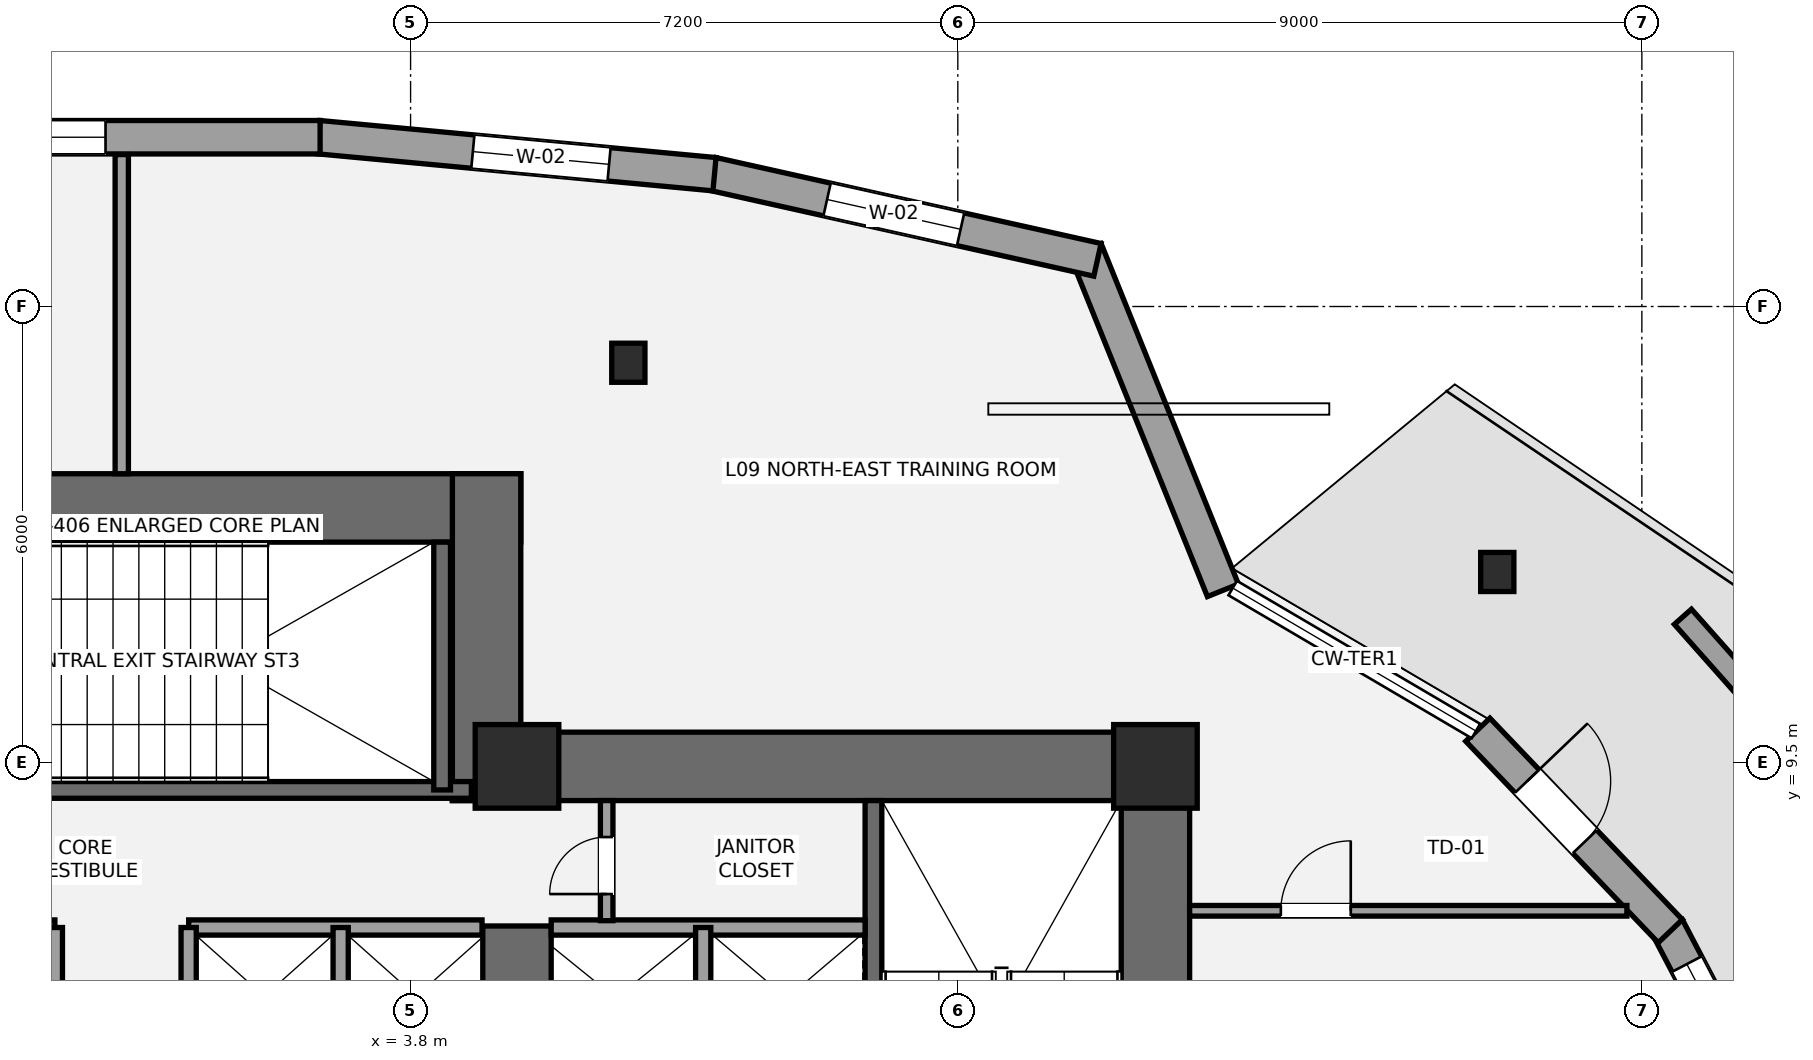
"""IFC4 building model, lengths in metres.
Left out: names, types, materials, properties, quantities, classifications, styles, units other than length and angle.
Written with IfcOpenShell. Run it as: python <this file> out.ifc"""

import sys

from ifc_helpers import new_model, si_unit, direction, frame, frame_2d, origin, origin_2d, place, context, subcontext, project, spatial, rectangle, i_section, extrude, element, fill, save


model = new_model("IFC4")
c1 = context("Model", 3, precision=1e-05, world=origin(), true_north=direction((0.0, 1.0)))
c2 = subcontext(c1, "Body", "Model", "MODEL_VIEW")
j1 = project(units=[si_unit("LENGTHUNIT", "METRE"), si_unit("PLANEANGLEUNIT", "RADIAN")], contexts=[c1])
p1 = place(None, origin())
s1 = spatial("IfcSite", under=j1, at=p1, CompositionType="ELEMENT")
p2 = place(p1, origin())
s2 = spatial("IfcBuilding", under=s1, at=p2, CompositionType="ELEMENT")
p3 = place(p2, frame((0.0, 0.0, 37.8)))
s3 = spatial("IfcBuildingStorey", under=s2, at=p3, CompositionType="ELEMENT", Elevation=37.8)
p4 = place(p3, frame((13.6, 0.95, 0.0), z_axis=(0.0, 0.0, 1.0), x_axis=(0.0, 1.0, 0.0)))
e1 = element("IfcWall", 1, at=p4, inside=s3, PredefinedType="SHEAR", context=c2, shape_type="SweptSolid", body=[
    extrude(rectangle(XDim=8.95, YDim=0.9, at=frame_2d((4.475, 0.0))), origin(), (0.0, 0.0, 1.0), 3.6),
])
p5 = place(p3, frame((4.35, 9.45, 0.0), z_axis=(0.0, 0.0, 1.0), x_axis=(1.0, 0.0, 0.0)))
e2 = element("IfcWall", 2, at=p5, inside=s3, PredefinedType="SHEAR", context=c2, shape_type="SweptSolid", body=[
    extrude(rectangle(XDim=9.7, YDim=0.9, at=frame_2d((4.85, 0.0))), origin(), (0.0, 0.0, 1.0), 3.6),
])
p6 = place(p3, frame((5.2, 5.35, 0.0), z_axis=(0.0, 0.0, 1.0), x_axis=(0.0, 1.0, 0.0)))
e3 = element("IfcWall", 3, at=p6, inside=s3, PredefinedType="SHEAR", context=c2, shape_type="SweptSolid", body=[
    extrude(rectangle(XDim=2.0, YDim=0.9, at=frame_2d((1.0, 0.0))), origin(), (0.0, 0.0, 1.0), 3.6),
])
p7 = place(p3, frame((9.89, 1.85, 0.0), z_axis=(0.0, 0.0, 1.0), x_axis=(0.0, 1.0, 0.0)))
e4 = element("IfcWall", 4, at=p7, inside=s3, PredefinedType="SHEAR", context=c2, shape_type="SweptSolid", body=[
    extrude(rectangle(XDim=7.15, YDim=0.22, at=frame_2d((3.575, 0.0))), origin(), (0.0, 0.0, 1.0), 3.6),
])
p8 = place(p3, frame((-5.25, 12.85, 0.0), z_axis=(0.0, 0.0, 1.0), x_axis=(1.0, 0.0, 0.0)))
e5 = element("IfcWall", 5, at=p8, inside=s3, PredefinedType="SHEAR", context=c2, shape_type="SweptSolid", body=[
    extrude(rectangle(XDim=10.5, YDim=0.9, at=frame_2d((5.25, 0.0))), origin(), (0.0, 0.0, 1.0), 3.6),
])
p9 = place(p3, frame((4.8, 9.0, 0.0), z_axis=(0.0, 0.0, 1.0), x_axis=(0.0, 1.0, 0.0)))
e6 = element("IfcWall", 6, at=p9, inside=s3, PredefinedType="SHEAR", context=c2, shape_type="SweptSolid", body=[
    extrude(rectangle(XDim=4.3, YDim=0.9, at=frame_2d((2.15, 0.0))), origin(), (0.0, 0.0, 1.0), 3.6),
])
p10 = place(p3, frame((-4.7, 9.14, 0.0), z_axis=(0.0, 0.0, 1.0), x_axis=(1.0, 0.0, 0.0)))
e7 = element("IfcWall", 7, at=p10, inside=s3, PredefinedType="SHEAR", context=c2, shape_type="SweptSolid", body=[
    extrude(rectangle(XDim=9.3, YDim=0.22, at=frame_2d((4.65, 0.0))), origin(), (0.0, 0.0, 1.0), 3.6),
])
p11 = place(p10, frame((1.15, 0.0, 0.0)))
e8 = element("IfcOpeningElement", 8, at=p11, cuts=e7, PredefinedType="OPENING", context=c2, shape_type="SweptSolid", body=[
    extrude(rectangle(XDim=1.05, YDim=2.15, at=frame_2d((0.525, 1.075))), frame((0.0, 0.12, 0.0), z_axis=(0.0, -1.0, 0.0), x_axis=(1.0, 0.0, 0.0)), (0.0, 0.0, 1.0), 0.24),
])
p12 = place(p3, frame((4.215, 9.14, 0.0), z_axis=(0.0, 0.0, 1.0), x_axis=(0.0, 1.0, 0.0)))
e9 = element("IfcWall", 9, at=p12, inside=s3, PredefinedType="SHEAR", context=c2, shape_type="SweptSolid", body=[
    extrude(rectangle(XDim=3.26, YDim=0.22, at=frame_2d((1.63, 0.0))), origin(), (0.0, 0.0, 1.0), 3.6),
])
for number, where, z_axis, x_axis in (
    (10, (5.2, 9.45, 0.0), (0.0, 0.0, 1.0), (1.0, 0.0, 0.0)),
    (11, (13.6, 9.45, 0.0), (0.0, 0.0, 1.0), (1.0, 0.0, 0.0)),
):
    element("IfcColumn", number, at=place(p3, frame(where, z_axis=z_axis, x_axis=x_axis)), inside=s3, PredefinedType="COLUMN", context=c2, shape_type="SweptSolid", body=[
        extrude(rectangle(XDim=1.1, YDim=1.1, at=origin_2d()), origin(), (0.0, 0.0, 1.0), 3.6),
    ])
for number, where, z_axis, x_axis in (
    (12, (18.098, 12.007, 0.0), (0.0, 0.0, 1.0), (1.0, 0.0, 0.0)),
    (13, (6.665, 14.76, 0.0), (0.0, 0.0, 1.0), (1.0, 0.0, 0.0)),
):
    element("IfcColumn", number, at=place(p3, frame(where, z_axis=z_axis, x_axis=x_axis)), inside=s3, PredefinedType="COLUMN", context=c2, shape_type="SweptSolid", body=[
        extrude(i_section(OverallWidth=0.437, OverallDepth=0.514, WebThickness=0.061, FlangeThickness=0.097, at=origin_2d()), origin(), (0.0, 0.0, 1.0), 3.6),
    ])
p13 = place(p3, frame((20.338, 7.332, 0.0), z_axis=(0.0, 0.0, 1.0), x_axis=(0.463942961536, -0.885865073497, 0.0)))
e14 = element("IfcWall", 14, at=p13, inside=s3, PredefinedType="STANDARD", context=c2, shape_type="SweptSolid", body=[
    extrude(rectangle(XDim=3.277, YDim=0.44, at=frame_2d((1.638, 0.0))), origin(), (0.0, 0.0, 1.0), 2.533),
])
p14 = place(p13, frame((0.546, 0.0, 0.58)))
e15 = element("IfcOpeningElement", 15, at=p14, cuts=e14, PredefinedType="OPENING", context=c2, shape_type="SweptSolid", body=[
    extrude(rectangle(XDim=0.9, YDim=1.35, at=frame_2d((0.45, 0.675))), frame((0.0, 0.23, 0.0), z_axis=(0.0, -1.0, 0.0), x_axis=(1.0, 0.0, 0.0)), (0.0, 0.0, 1.0), 0.46),
])
p15 = place(p3, frame((17.842, 9.932, 0.0), z_axis=(0.0, 0.0, 1.0), x_axis=(0.690906512539, -0.722944113284, 0.0)))
e16 = element("IfcWall", 16, at=p15, inside=s3, PredefinedType="STANDARD", context=c2, shape_type="SweptSolid", body=[
    extrude(rectangle(XDim=3.666, YDim=0.44, at=frame_2d((1.833, 0.0))), origin(), (0.0, 0.0, 1.0), 2.533),
])
p16 = place(p15, frame((0.938, 0.0, 0.0)))
e17 = element("IfcOpeningElement", 17, at=p16, cuts=e16, PredefinedType="OPENING", context=c2, shape_type="SweptSolid", body=[
    extrude(rectangle(XDim=1.1, YDim=2.15, at=frame_2d((0.55, 1.075))), frame((0.0, 0.23, 0.0), z_axis=(0.0, -1.0, 0.0), x_axis=(1.0, 0.0, 0.0)), (0.0, 0.0, 1.0), 0.46),
])
p17 = place(p3, frame((12.681, 16.247, 0.0), z_axis=(0.0, 0.0, 1.0), x_axis=(0.373950808571, -0.927448539149, 0.0)))
e18 = element("IfcWall", 18, at=p17, inside=s3, PredefinedType="STANDARD", context=c2, shape_type="SweptSolid", body=[
    extrude(rectangle(XDim=4.831, YDim=0.44, at=frame_2d((2.416, 0.0))), origin(), (0.0, 0.0, 1.0), 2.533),
])
p18 = place(p3, frame((7.771, 17.245, 0.0), z_axis=(0.0, 0.0, 1.0), x_axis=(0.975980782399, -0.217856632648, 0.0)))
e19 = element("IfcWall", 19, at=p18, inside=s3, PredefinedType="STANDARD", context=c2, shape_type="SweptSolid", body=[
    extrude(rectangle(XDim=5.191, YDim=0.44, at=frame_2d((2.595, 0.0))), origin(), (0.0, 0.0, 1.0), 2.533),
])
p19 = place(p18, frame((1.546, 0.0, 0.65)))
e20 = element("IfcOpeningElement", 20, at=p19, cuts=e19, PredefinedType="OPENING", context=c2, shape_type="SweptSolid", body=[
    extrude(rectangle(XDim=1.8, YDim=1.7, at=frame_2d((0.9, 0.85))), frame((0.0, 0.23, 0.0), z_axis=(0.0, -1.0, 0.0), x_axis=(1.0, 0.0, 0.0)), (0.0, 0.0, 1.0), 0.46),
])
p20 = place(p3, frame((2.589, 17.728, 0.0), z_axis=(0.0, 0.0, 1.0), x_axis=(0.995649119539, -0.093181708301, 0.0)))
e21 = element("IfcWall", 21, at=p20, inside=s3, PredefinedType="STANDARD", context=c2, shape_type="SweptSolid", body=[
    extrude(rectangle(XDim=5.232, YDim=0.44, at=frame_2d((2.616, 0.0))), origin(), (0.0, 0.0, 1.0), 2.533),
])
p21 = place(p20, frame((2.039, 0.0, 0.65)))
e22 = element("IfcOpeningElement", 22, at=p21, cuts=e21, PredefinedType="OPENING", context=c2, shape_type="SweptSolid", body=[
    extrude(rectangle(XDim=1.8, YDim=1.7, at=frame_2d((0.9, 0.85))), frame((0.0, 0.23, 0.0), z_axis=(0.0, -1.0, 0.0), x_axis=(1.0, 0.0, 0.0)), (0.0, 0.0, 1.0), 0.46),
])
p22 = place(p3, frame((-2.61, 17.727, 0.0), z_axis=(0.0, 0.0, 1.0), x_axis=(1.0, 0.0, 0.0)))
e23 = element("IfcWall", 23, at=p22, inside=s3, PredefinedType="STANDARD", context=c2, shape_type="SweptSolid", body=[
    extrude(rectangle(XDim=5.219, YDim=0.44, at=frame_2d((2.61, 0.0))), origin(), (0.0, 0.0, 1.0), 2.533),
])
p23 = place(p22, frame((0.596, 0.0, 0.65)))
e24 = element("IfcOpeningElement", 24, at=p23, cuts=e23, PredefinedType="OPENING", context=c2, shape_type="SweptSolid", body=[
    extrude(rectangle(XDim=1.8, YDim=1.7, at=frame_2d((0.9, 0.85))), frame((0.0, 0.23, 0.0), z_axis=(0.0, -1.0, 0.0), x_axis=(1.0, 0.0, 0.0)), (0.0, 0.0, 1.0), 0.46),
])
p24 = place(p3, frame((23.213, 8.405, 0.0), z_axis=(0.0, 0.0, 1.0), x_axis=(-0.663501894005, 0.748174603051, 0.0)))
e25 = element("IfcWall", 25, at=p24, inside=s3, PredefinedType="PARAPET", context=c2, shape_type="SweptSolid", body=[
    extrude(rectangle(XDim=4.028, YDim=0.3, at=frame_2d((2.014, 0.0))), origin(), (0.0, 0.0, 1.0), 0.45),
])
p25 = place(p3, frame((5.65, 7.33, 0.0), z_axis=(0.0, 0.0, 1.0), x_axis=(1.0, 0.0, 0.0)))
e26 = element("IfcWall", 26, at=p25, inside=s3, PredefinedType="SOLIDWALL", context=c2, shape_type="SweptSolid", body=[
    extrude(rectangle(XDim=4.13, YDim=0.2, at=frame_2d((2.065, 0.0))), origin(), (0.0, 0.0, 1.0), 3.4),
])
p26 = place(p3, frame((7.65, 5.47, 0.0), z_axis=(0.0, 0.0, 1.0), x_axis=(0.0, 1.0, 0.0)))
e27 = element("IfcWall", 27, at=p26, inside=s3, PredefinedType="SOLIDWALL", context=c2, shape_type="SweptSolid", body=[
    extrude(rectangle(XDim=1.86, YDim=0.2, at=frame_2d((0.93, 0.0))), origin(), (0.0, 0.0, 1.0), 3.4),
])
for number, where, z_axis, x_axis in (
    (28, (-4.74, 7.33, 0.0), (0.0, 0.0, 1.0), (1.0, 0.0, 0.0)),
    (29, (0.88, 7.33, 0.0), (0.0, 0.0, 1.0), (1.0, 0.0, 0.0)),
):
    element("IfcWall", number, at=place(p3, frame(where, z_axis=z_axis, x_axis=x_axis)), inside=s3, PredefinedType="SOLIDWALL", context=c2, shape_type="SweptSolid", body=[
        extrude(rectangle(XDim=3.86, YDim=0.2, at=frame_2d((1.93, 0.0))), origin(), (0.0, 0.0, 1.0), 3.4),
    ])
for number, where, z_axis, x_axis in (
    (30, (2.88, 5.52, 0.0), (0.0, 0.0, 1.0), (0.0, 1.0, 0.0)),
    (31, (-0.88, 5.52, 0.0), (0.0, 0.0, 1.0), (0.0, 1.0, 0.0)),
    (32, (0.88, 5.52, 0.0), (0.0, 0.0, 1.0), (0.0, 1.0, 0.0)),
):
    element("IfcWall", number, at=place(p3, frame(where, z_axis=z_axis, x_axis=x_axis)), inside=s3, PredefinedType="SOLIDWALL", context=c2, shape_type="SweptSolid", body=[
        extrude(rectangle(XDim=1.81, YDim=0.2, at=frame_2d((0.905, 0.0))), origin(), (0.0, 0.0, 1.0), 3.4),
    ])
p27 = place(p3, frame((6.38, 7.42, 0.0), z_axis=(0.0, 0.0, 1.0), x_axis=(0.0, 1.0, 0.0)))
e33 = element("IfcWall", 33, at=p27, inside=s3, PredefinedType="PARTITIONING", context=c2, shape_type="SweptSolid", body=[
    extrude(rectangle(XDim=1.58, YDim=0.165, at=frame_2d((0.79, 0.0))), origin(), (0.0, 0.0, 1.0), 3.4),
])
p28 = place(p27, frame((0.35, 0.0, 0.0)))
e34 = element("IfcOpeningElement", 34, at=p28, cuts=e33, PredefinedType="OPENING", context=c2, shape_type="SweptSolid", body=[
    extrude(rectangle(XDim=0.75, YDim=2.1, at=frame_2d((0.375, 1.05))), frame((0.0, 0.093, 0.0), z_axis=(0.0, -1.0, 0.0), x_axis=(1.0, 0.0, 0.0)), (0.0, 0.0, 1.0), 0.185),
])
p29 = place(p3, frame((14.05, 7.55, 0.0), z_axis=(0.0, 0.0, 1.0), x_axis=(1.0, 0.0, 0.0)))
e35 = element("IfcWall", 35, at=p29, inside=s3, PredefinedType="PARTITIONING", context=c2, shape_type="SweptSolid", body=[
    extrude(rectangle(XDim=5.753, YDim=0.14, at=frame_2d((2.876, 0.0))), origin(), (0.0, 0.0, 1.0), 2.853),
])
p30 = place(p29, frame((1.2, 0.0, 0.0)))
e36 = element("IfcOpeningElement", 36, at=p30, cuts=e35, PredefinedType="OPENING", context=c2, shape_type="SweptSolid", body=[
    extrude(rectangle(XDim=0.92, YDim=2.15, at=frame_2d((0.46, 1.075))), frame((0.0, 0.08, 0.0), z_axis=(0.0, -1.0, 0.0), x_axis=(1.0, 0.0, 0.0)), (0.0, 0.0, 1.0), 0.16),
])
p31 = place(p3, frame((0.0, 13.3, 0.0), z_axis=(0.0, 0.0, 1.0), x_axis=(0.0, 1.0, 0.0)))
e37 = element("IfcWall", 37, at=p31, inside=s3, PredefinedType="PARTITIONING", context=c2, shape_type="SweptSolid", body=[
    extrude(rectangle(XDim=4.199, YDim=0.175, at=frame_2d((2.1, 0.0))), origin(), (0.0, 0.0, 1.0), 3.4),
])
p32 = place(p14, origin())
e38 = element("IfcWindow", 38, at=p32, inside=s3, PartitioningType="SINGLE_PANEL", PredefinedType="WINDOW", context=c2, shape_type="SweptSolid", body=[
    extrude(rectangle(XDim=0.9, YDim=1.35, at=frame_2d((0.45, 0.675))), frame((0.0, -0.01, 0.0), z_axis=(0.0, -1.0, 0.0), x_axis=(1.0, 0.0, 0.0)), (0.0, 0.0, 1.0), 0.06),
])
fill(e15, e38)
p33 = place(p16, origin())
e39 = element("IfcDoor", 39, at=p33, inside=s3, OperationType="SINGLE_SWING_LEFT", PredefinedType="DOOR", context=c2, shape_type="SweptSolid", body=[
    extrude(rectangle(XDim=1.1, YDim=2.15, at=frame_2d((0.55, 1.075))), frame((0.0, 0.025, 0.0), z_axis=(0.0, -1.0, 0.0), x_axis=(1.0, 0.0, 0.0)), (0.0, 0.0, 1.0), 0.05),
])
fill(e17, e39)
p34 = place(p19, origin())
e40 = element("IfcWindow", 40, at=p34, inside=s3, PartitioningType="SINGLE_PANEL", PredefinedType="WINDOW", context=c2, shape_type="SweptSolid", body=[
    extrude(rectangle(XDim=1.8, YDim=1.7, at=frame_2d((0.9, 0.85))), frame((0.0, -0.01, 0.0), z_axis=(0.0, -1.0, 0.0), x_axis=(1.0, 0.0, 0.0)), (0.0, 0.0, 1.0), 0.06),
])
fill(e20, e40)
p35 = place(p21, origin())
e41 = element("IfcWindow", 41, at=p35, inside=s3, PartitioningType="SINGLE_PANEL", PredefinedType="WINDOW", context=c2, shape_type="SweptSolid", body=[
    extrude(rectangle(XDim=1.8, YDim=1.7, at=frame_2d((0.9, 0.85))), frame((0.0, -0.01, 0.0), z_axis=(0.0, -1.0, 0.0), x_axis=(1.0, 0.0, 0.0)), (0.0, 0.0, 1.0), 0.06),
])
fill(e22, e41)
p36 = place(p23, origin())
e42 = element("IfcWindow", 42, at=p36, inside=s3, PartitioningType="SINGLE_PANEL", PredefinedType="WINDOW", context=c2, shape_type="SweptSolid", body=[
    extrude(rectangle(XDim=1.8, YDim=1.7, at=frame_2d((0.9, 0.85))), frame((0.0, -0.01, 0.0), z_axis=(0.0, -1.0, 0.0), x_axis=(1.0, 0.0, 0.0)), (0.0, 0.0, 1.0), 0.06),
])
fill(e24, e42)
p37 = place(p28, origin())
e43 = element("IfcDoor", 43, at=p37, inside=s3, OperationType="SINGLE_SWING_LEFT", PredefinedType="DOOR", context=c2, shape_type="SweptSolid", body=[
    extrude(rectangle(XDim=0.75, YDim=2.1, at=frame_2d((0.375, 1.05))), frame((0.0, 0.025, 0.0), z_axis=(0.0, -1.0, 0.0), x_axis=(1.0, 0.0, 0.0)), (0.0, 0.0, 1.0), 0.05),
])
fill(e34, e43)
p38 = place(p30, origin())
e44 = element("IfcDoor", 44, at=p38, inside=s3, OperationType="SINGLE_SWING_RIGHT", PredefinedType="DOOR", context=c2, shape_type="SweptSolid", body=[
    extrude(rectangle(XDim=0.92, YDim=2.15, at=frame_2d((0.46, 1.075))), frame((0.0, 0.025, 0.0), z_axis=(0.0, -1.0, 0.0), x_axis=(1.0, 0.0, 0.0)), (0.0, 0.0, 1.0), 0.05),
])
fill(e36, e44)
save(model, sys.argv[1])
